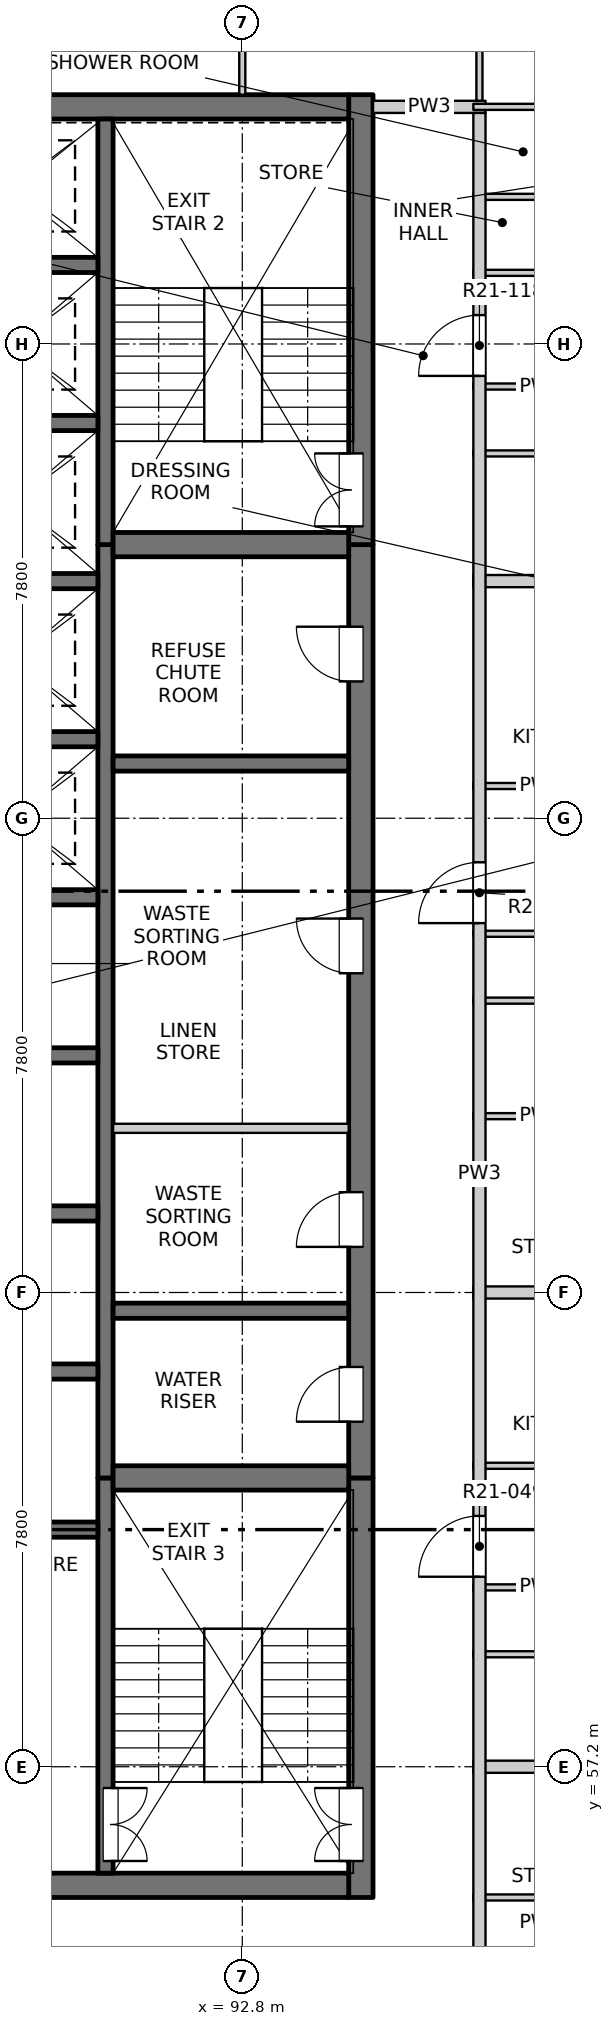
"""IFC4 building model, lengths in metres.
Left out: names, types, materials, properties, quantities, classifications, styles, units other than length and angle.
Written with IfcOpenShell. Run it as: python <this file> out.ifc"""

import sys

from ifc_helpers import new_model, si_unit, direction, frame, frame_2d, origin, place, context, subcontext, project, spatial, rectangle, extrude, element, fill, save


model = new_model("IFC4")
c1 = context("Model", 3, precision=1e-05, world=origin(), true_north=direction((0.0, 1.0)))
c2 = subcontext(c1, "Body", "Model", "MODEL_VIEW")
j1 = project(units=[si_unit("LENGTHUNIT", "METRE"), si_unit("PLANEANGLEUNIT", "RADIAN")], contexts=[c1])
p1 = place(None, origin())
s1 = spatial("IfcSite", under=j1, at=p1, CompositionType="ELEMENT")
p2 = place(p1, origin())
s2 = spatial("IfcBuilding", under=s1, at=p2, CompositionType="ELEMENT")
p3 = place(p2, frame((0.0, 0.0, 214.3)))
s3 = spatial("IfcBuildingStorey", under=s2, at=p3, CompositionType="ELEMENT", Elevation=214.3)
p4 = place(p3, frame((94.75, 55.05, -0.25), z_axis=(0.0, 0.0, 1.0), x_axis=(0.0, 1.0, 0.0)))
e1 = element("IfcWall", 1, at=p4, inside=s3, PredefinedType="SOLIDWALL", context=c2, shape_type="SweptSolid", body=[
    extrude(rectangle(XDim=6.9, YDim=0.4, at=frame_2d((3.45, 0.0))), origin(), (0.0, 0.0, 1.0), 3.4),
])
p5 = place(p4, frame((0.6, 0.0, 0.25)))
e2 = element("IfcOpeningElement", 2, at=p5, cuts=e1, PredefinedType="OPENING", context=c2, shape_type="SweptSolid", body=[
    extrude(rectangle(XDim=1.2, YDim=2.1, at=frame_2d((0.6, 1.05))), frame((0.0, 0.21, 0.0), z_axis=(0.0, -1.0, 0.0), x_axis=(1.0, 0.0, 0.0)), (0.0, 0.0, 1.0), 0.42),
])
p6 = place(p3, frame((94.75, 61.95, -0.25), z_axis=(0.0, 0.0, 1.0), x_axis=(0.0, 1.0, 0.0)))
e3 = element("IfcWall", 3, at=p6, inside=s3, PredefinedType="SOLIDWALL", context=c2, shape_type="SweptSolid", body=[
    extrude(rectangle(XDim=15.35, YDim=0.4, at=frame_2d((7.675, 0.0))), origin(), (0.0, 0.0, 1.0), 3.4),
])
p7 = place(p6, frame((0.925, 0.0, 0.25)))
e4 = element("IfcOpeningElement", 4, at=p7, cuts=e3, PredefinedType="OPENING", context=c2, shape_type="SweptSolid", body=[
    extrude(rectangle(XDim=0.9, YDim=2.1, at=frame_2d((0.45, 1.05))), frame((0.0, 0.21, 0.0), z_axis=(0.0, -1.0, 0.0), x_axis=(1.0, 0.0, 0.0)), (0.0, 0.0, 1.0), 0.42),
])
p8 = place(p6, frame((3.8, 0.0, 0.25)))
e5 = element("IfcOpeningElement", 5, at=p8, cuts=e3, PredefinedType="OPENING", context=c2, shape_type="SweptSolid", body=[
    extrude(rectangle(XDim=0.9, YDim=2.1, at=frame_2d((0.45, 1.05))), frame((0.0, 0.21, 0.0), z_axis=(0.0, -1.0, 0.0), x_axis=(1.0, 0.0, 0.0)), (0.0, 0.0, 1.0), 0.42),
])
p9 = place(p6, frame((8.3, 0.0, 0.25)))
e6 = element("IfcOpeningElement", 6, at=p9, cuts=e3, PredefinedType="OPENING", context=c2, shape_type="SweptSolid", body=[
    extrude(rectangle(XDim=0.9, YDim=2.1, at=frame_2d((0.45, 1.05))), frame((0.0, 0.21, 0.0), z_axis=(0.0, -1.0, 0.0), x_axis=(1.0, 0.0, 0.0)), (0.0, 0.0, 1.0), 0.42),
])
p10 = place(p6, frame((13.1, 0.0, 0.25)))
e7 = element("IfcOpeningElement", 7, at=p10, cuts=e3, PredefinedType="OPENING", context=c2, shape_type="SweptSolid", body=[
    extrude(rectangle(XDim=0.9, YDim=2.1, at=frame_2d((0.45, 1.05))), frame((0.0, 0.21, 0.0), z_axis=(0.0, -1.0, 0.0), x_axis=(1.0, 0.0, 0.0)), (0.0, 0.0, 1.0), 0.42),
])
p11 = place(p3, frame((94.75, 77.3, -0.25), z_axis=(0.0, 0.0, 1.0), x_axis=(0.0, 1.0, 0.0)))
e8 = element("IfcWall", 8, at=p11, inside=s3, PredefinedType="SOLIDWALL", context=c2, shape_type="SweptSolid", body=[
    extrude(rectangle(XDim=7.4, YDim=0.4, at=frame_2d((3.7, 0.0))), origin(), (0.0, 0.0, 1.0), 3.4),
])
p12 = place(p11, frame((0.3, 0.0, 0.25)))
e9 = element("IfcOpeningElement", 9, at=p12, cuts=e8, PredefinedType="OPENING", context=c2, shape_type="SweptSolid", body=[
    extrude(rectangle(XDim=1.2, YDim=2.1, at=frame_2d((0.6, 1.05))), frame((0.0, 0.21, 0.0), z_axis=(0.0, -1.0, 0.0), x_axis=(1.0, 0.0, 0.0)), (0.0, 0.0, 1.0), 0.42),
])
p13 = place(p3, frame((75.45, 55.25, -0.25), z_axis=(0.0, 0.0, 1.0), x_axis=(1.0, 0.0, 0.0)))
e10 = element("IfcWall", 10, at=p13, inside=s3, PredefinedType="SOLIDWALL", context=c2, shape_type="SweptSolid", body=[
    extrude(rectangle(XDim=19.1, YDim=0.4, at=frame_2d((9.55, 0.0))), origin(), (0.0, 0.0, 1.0), 3.4),
])
p14 = place(p13, frame((8.8, 0.0, 0.25)))
e11 = element("IfcOpeningElement", 11, at=p14, cuts=e10, PredefinedType="OPENING", context=c2, shape_type="SweptSolid", body=[
    extrude(rectangle(XDim=1.5, YDim=2.1, at=frame_2d((0.75, 1.05))), frame((0.0, 0.21, 0.0), z_axis=(0.0, -1.0, 0.0), x_axis=(1.0, 0.0, 0.0)), (0.0, 0.0, 1.0), 0.42),
])
p15 = place(p3, frame((75.45, 84.5, -0.25), z_axis=(0.0, 0.0, 1.0), x_axis=(1.0, 0.0, 0.0)))
e12 = element("IfcWall", 12, at=p15, inside=s3, PredefinedType="SOLIDWALL", context=c2, shape_type="SweptSolid", body=[
    extrude(rectangle(XDim=19.1, YDim=0.4, at=frame_2d((9.55, 0.0))), origin(), (0.0, 0.0, 1.0), 3.4),
])
p16 = place(p3, frame((90.55, 55.45, -0.25), z_axis=(0.0, 0.0, 1.0), x_axis=(0.0, 1.0, 0.0)))
e13 = element("IfcWall", 13, at=p16, inside=s3, PredefinedType="SOLIDWALL", context=c2, shape_type="SweptSolid", body=[
    extrude(rectangle(XDim=6.5, YDim=0.25, at=frame_2d((3.25, 0.0))), origin(), (0.0, 0.0, 1.0), 3.4),
])
p17 = place(p16, frame((0.2, 0.0, 0.25)))
e14 = element("IfcOpeningElement", 14, at=p17, cuts=e13, PredefinedType="OPENING", context=c2, shape_type="SweptSolid", body=[
    extrude(rectangle(XDim=1.2, YDim=2.1, at=frame_2d((0.6, 1.05))), frame((0.0, 0.135, 0.0), z_axis=(0.0, -1.0, 0.0), x_axis=(1.0, 0.0, 0.0)), (0.0, 0.0, 1.0), 0.27),
])
p18 = place(p3, frame((90.55, 61.95, -0.25), z_axis=(0.0, 0.0, 1.0), x_axis=(0.0, 1.0, 0.0)))
e15 = element("IfcWall", 15, at=p18, inside=s3, PredefinedType="SOLIDWALL", context=c2, shape_type="SweptSolid", body=[
    extrude(rectangle(XDim=15.35, YDim=0.25, at=frame_2d((7.675, 0.0))), origin(), (0.0, 0.0, 1.0), 3.4),
])
p19 = place(p3, frame((90.55, 77.3, -0.25), z_axis=(0.0, 0.0, 1.0), x_axis=(0.0, 1.0, 0.0)))
e16 = element("IfcWall", 16, at=p19, inside=s3, PredefinedType="SOLIDWALL", context=c2, shape_type="SweptSolid", body=[
    extrude(rectangle(XDim=7.0, YDim=0.25, at=frame_2d((3.5, 0.0))), origin(), (0.0, 0.0, 1.0), 3.4),
])
for number, where, z_axis, x_axis in (
    (17, (87.425, 61.1, -0.25), (0.0, 0.0, 1.0), (1.0, 0.0, 0.0)),
    (18, (87.425, 63.7, -0.25), (0.0, 0.0, 1.0), (1.0, 0.0, 0.0)),
    (19, (87.425, 66.3, -0.25), (0.0, 0.0, 1.0), (1.0, 0.0, 0.0)),
    (20, (87.425, 68.9, -0.25), (0.0, 0.0, 1.0), (1.0, 0.0, 0.0)),
    (21, (87.425, 71.5, -0.25), (0.0, 0.0, 1.0), (1.0, 0.0, 0.0)),
    (22, (87.425, 74.1, -0.25), (0.0, 0.0, 1.0), (1.0, 0.0, 0.0)),
    (23, (87.425, 76.7, -0.25), (0.0, 0.0, 1.0), (1.0, 0.0, 0.0)),
    (24, (87.425, 79.3, -0.25), (0.0, 0.0, 1.0), (1.0, 0.0, 0.0)),
    (25, (87.425, 81.9, -0.25), (0.0, 0.0, 1.0), (1.0, 0.0, 0.0)),
):
    element("IfcWall", number, at=place(p3, frame(where, z_axis=z_axis, x_axis=x_axis)), inside=s3, PredefinedType="SOLIDWALL", context=c2, shape_type="SweptSolid", body=[
        extrude(rectangle(XDim=3.0, YDim=0.25, at=frame_2d((1.5, 0.0))), origin(), (0.0, 0.0, 1.0), 3.4),
    ])
p20 = place(p3, frame((90.675, 61.95, -0.25), z_axis=(0.0, 0.0, 1.0), x_axis=(1.0, 0.0, 0.0)))
e26 = element("IfcWall", 26, at=p20, inside=s3, PredefinedType="SOLIDWALL", context=c2, shape_type="SweptSolid", body=[
    extrude(rectangle(XDim=3.875, YDim=0.4, at=frame_2d((1.938, 0.0))), origin(), (0.0, 0.0, 1.0), 3.4),
])
for number, where, z_axis, x_axis in (
    (27, (90.675, 64.7, -0.25), (0.0, 0.0, 1.0), (1.0, 0.0, 0.0)),
    (28, (90.675, 73.7, -0.25), (0.0, 0.0, 1.0), (1.0, 0.0, 0.0)),
):
    element("IfcWall", number, at=place(p3, frame(where, z_axis=z_axis, x_axis=x_axis)), inside=s3, PredefinedType="SOLIDWALL", context=c2, shape_type="SweptSolid", body=[
        extrude(rectangle(XDim=3.875, YDim=0.25, at=frame_2d((1.938, 0.0))), origin(), (0.0, 0.0, 1.0), 3.4),
    ])
p21 = place(p3, frame((90.675, 77.3, -0.25), z_axis=(0.0, 0.0, 1.0), x_axis=(1.0, 0.0, 0.0)))
e29 = element("IfcWall", 29, at=p21, inside=s3, PredefinedType="SOLIDWALL", context=c2, shape_type="SweptSolid", body=[
    extrude(rectangle(XDim=3.875, YDim=0.4, at=frame_2d((1.938, 0.0))), origin(), (0.0, 0.0, 1.0), 3.4),
])
p22 = place(p3, frame((96.6, 55.05, 0.0), z_axis=(0.0, 0.0, 1.0), x_axis=(1.0, 0.0, 0.0)))
e30 = element("IfcWall", 30, at=p22, inside=s3, PredefinedType="PARTITIONING", context=c2, shape_type="SweptSolid", body=[
    extrude(rectangle(XDim=2.22, YDim=0.1, at=frame_2d((1.11, 0.0))), origin(), (0.0, 0.0, 1.0), 3.15),
])
p23 = place(p3, frame((96.6, 57.2, 0.0), z_axis=(0.0, 0.0, 1.0), x_axis=(1.0, 0.0, 0.0)))
e31 = element("IfcWall", 31, at=p23, inside=s3, PredefinedType="PARTITIONING", context=c2, shape_type="SweptSolid", body=[
    extrude(rectangle(XDim=11.5, YDim=0.2, at=frame_2d((5.75, 0.0))), origin(), (0.0, 0.0, 1.0), 3.15),
])
for number, where, z_axis, x_axis in (
    (32, (96.6, 59.05, 0.0), (0.0, 0.0, 1.0), (1.0, 0.0, 0.0)),
    (33, (96.6, 60.15, 0.0), (0.0, 0.0, 1.0), (1.0, 0.0, 0.0)),
    (34, (96.6, 62.15, 0.0), (0.0, 0.0, 1.0), (1.0, 0.0, 0.0)),
):
    element("IfcWall", number, at=place(p3, frame(where, z_axis=z_axis, x_axis=x_axis)), inside=s3, PredefinedType="PARTITIONING", context=c2, shape_type="SweptSolid", body=[
        extrude(rectangle(XDim=2.22, YDim=0.1, at=frame_2d((1.11, 0.0))), origin(), (0.0, 0.0, 1.0), 3.15),
    ])
p24 = place(p3, frame((96.6, 65.0, 0.0), z_axis=(0.0, 0.0, 1.0), x_axis=(1.0, 0.0, 0.0)))
e35 = element("IfcWall", 35, at=p24, inside=s3, PredefinedType="PARTITIONING", context=c2, shape_type="SweptSolid", body=[
    extrude(rectangle(XDim=11.5, YDim=0.2, at=frame_2d((5.75, 0.0))), origin(), (0.0, 0.0, 1.0), 3.15),
])
p25 = place(p3, frame((90.675, 67.7, 0.0), z_axis=(0.0, 0.0, 1.0), x_axis=(1.0, 0.0, 0.0)))
e36 = element("IfcWall", 36, at=p25, inside=s3, PredefinedType="PARTITIONING", context=c2, shape_type="SweptSolid", body=[
    extrude(rectangle(XDim=3.875, YDim=0.15, at=frame_2d((1.938, 0.0))), origin(), (0.0, 0.0, 1.0), 3.15),
])
for number, where, z_axis, x_axis in (
    (37, (96.6, 67.9, 0.0), (0.0, 0.0, 1.0), (1.0, 0.0, 0.0)),
    (38, (96.6, 69.8, 0.0), (0.0, 0.0, 1.0), (1.0, 0.0, 0.0)),
    (39, (96.6, 70.9, 0.0), (0.0, 0.0, 1.0), (1.0, 0.0, 0.0)),
    (40, (96.6, 73.33, 0.0), (0.0, 0.0, 1.0), (1.0, 0.0, 0.0)),
):
    element("IfcWall", number, at=place(p3, frame(where, z_axis=z_axis, x_axis=x_axis)), inside=s3, PredefinedType="PARTITIONING", context=c2, shape_type="SweptSolid", body=[
        extrude(rectangle(XDim=2.22, YDim=0.1, at=frame_2d((1.11, 0.0))), origin(), (0.0, 0.0, 1.0), 3.15),
    ])
p26 = place(p3, frame((96.6, 76.7, 0.0), z_axis=(0.0, 0.0, 1.0), x_axis=(1.0, 0.0, 0.0)))
e41 = element("IfcWall", 41, at=p26, inside=s3, PredefinedType="PARTITIONING", context=c2, shape_type="SweptSolid", body=[
    extrude(rectangle(XDim=11.5, YDim=0.2, at=frame_2d((5.75, 0.0))), origin(), (0.0, 0.0, 1.0), 2.55),
])
for number, where, z_axis, x_axis in (
    (42, (96.6, 78.8, 0.0), (0.0, 0.0, 1.0), (1.0, 0.0, 0.0)),
    (43, (96.6, 79.9, 0.0), (0.0, 0.0, 1.0), (1.0, 0.0, 0.0)),
    (44, (96.6, 81.77, 0.0), (0.0, 0.0, 1.0), (1.0, 0.0, 0.0)),
    (45, (96.6, 83.02, 0.0), (0.0, 0.0, 1.0), (1.0, 0.0, 0.0)),
):
    element("IfcWall", number, at=place(p3, frame(where, z_axis=z_axis, x_axis=x_axis)), inside=s3, PredefinedType="PARTITIONING", context=c2, shape_type="SweptSolid", body=[
        extrude(rectangle(XDim=2.22, YDim=0.1, at=frame_2d((1.11, 0.0))), origin(), (0.0, 0.0, 1.0), 3.15),
    ])
p27 = place(p3, frame((94.95, 84.5, 0.0), z_axis=(0.0, 0.0, 1.0), x_axis=(1.0, 0.0, 0.0)))
e46 = element("IfcWall", 46, at=p27, inside=s3, PredefinedType="PARTITIONING", context=c2, shape_type="SweptSolid", body=[
    extrude(rectangle(XDim=1.85, YDim=0.2, at=frame_2d((0.925, 0.0))), origin(), (0.0, 0.0, 1.0), 3.15),
])
p28 = place(p3, frame((96.6, 84.5, 0.0), z_axis=(0.0, 0.0, 1.0), x_axis=(1.0, 0.0, 0.0)))
e47 = element("IfcWall", 47, at=p28, inside=s3, PredefinedType="PARTITIONING", context=c2, shape_type="SweptSolid", body=[
    extrude(rectangle(XDim=11.5, YDim=0.1, at=frame_2d((5.75, 0.0))), origin(), (0.0, 0.0, 1.0), 3.15),
])
p29 = place(p28, frame((2.635, 0.0, 0.0)))
e48 = element("IfcOpeningElement", 48, at=p29, cuts=e47, PredefinedType="OPENING", context=c2, shape_type="SweptSolid", body=[
    extrude(rectangle(XDim=0.9, YDim=2.1, at=frame_2d((0.45, 1.05))), frame((0.0, 0.06, 0.0), z_axis=(0.0, -1.0, 0.0), x_axis=(1.0, 0.0, 0.0)), (0.0, 0.0, 1.0), 0.12),
])
p30 = place(p3, frame((92.8, 84.7, 0.0), z_axis=(0.0, 0.0, 1.0), x_axis=(0.0, 1.0, 0.0)))
e49 = element("IfcWall", 49, at=p30, inside=s3, PredefinedType="PARTITIONING", context=c2, shape_type="SweptSolid", body=[
    extrude(rectangle(XDim=3.4, YDim=0.1, at=frame_2d((1.7, 0.0))), origin(), (0.0, 0.0, 1.0), 3.15),
])
p31 = place(p30, frame((1.3, 0.0, 0.0)))
e50 = element("IfcOpeningElement", 50, at=p31, cuts=e49, PredefinedType="OPENING", context=c2, shape_type="SweptSolid", body=[
    extrude(rectangle(XDim=0.9, YDim=2.1, at=frame_2d((0.45, 1.05))), frame((0.0, 0.06, 0.0), z_axis=(0.0, -1.0, 0.0), x_axis=(1.0, 0.0, 0.0)), (0.0, 0.0, 1.0), 0.12),
])
p32 = place(p3, frame((96.7, 49.5, 0.0), z_axis=(0.0, 0.0, 1.0), x_axis=(0.0, 1.0, 0.0)))
e51 = element("IfcWall", 51, at=p32, inside=s3, PredefinedType="PARTITIONING", context=c2, shape_type="SweptSolid", body=[
    extrude(rectangle(XDim=34.9, YDim=0.2, at=frame_2d((17.45, 0.0))), origin(), (0.0, 0.0, 1.0), 3.15),
])
p33 = place(p32, frame((3.275, 0.0, 0.0)))
e52 = element("IfcOpeningElement", 52, at=p33, cuts=e51, PredefinedType="OPENING", context=c2, shape_type="SweptSolid", body=[
    extrude(rectangle(XDim=1.0, YDim=2.1, at=frame_2d((0.5, 1.05))), frame((0.0, 0.11, 0.0), z_axis=(0.0, -1.0, 0.0), x_axis=(1.0, 0.0, 0.0)), (0.0, 0.0, 1.0), 0.22),
])
p34 = place(p32, frame((10.825, 0.0, 0.0)))
e53 = element("IfcOpeningElement", 53, at=p34, cuts=e51, PredefinedType="OPENING", context=c2, shape_type="SweptSolid", body=[
    extrude(rectangle(XDim=1.0, YDim=2.1, at=frame_2d((0.5, 1.05))), frame((0.0, 0.11, 0.0), z_axis=(0.0, -1.0, 0.0), x_axis=(1.0, 0.0, 0.0)), (0.0, 0.0, 1.0), 0.22),
])
p35 = place(p32, frame((21.575, 0.0, 0.0)))
e54 = element("IfcOpeningElement", 54, at=p35, cuts=e51, PredefinedType="OPENING", context=c2, shape_type="SweptSolid", body=[
    extrude(rectangle(XDim=1.0, YDim=2.1, at=frame_2d((0.5, 1.05))), frame((0.0, 0.11, 0.0), z_axis=(0.0, -1.0, 0.0), x_axis=(1.0, 0.0, 0.0)), (0.0, 0.0, 1.0), 0.22),
])
p36 = place(p32, frame((30.575, 0.0, 0.0)))
e55 = element("IfcOpeningElement", 55, at=p36, cuts=e51, PredefinedType="OPENING", context=c2, shape_type="SweptSolid", body=[
    extrude(rectangle(XDim=1.0, YDim=2.1, at=frame_2d((0.5, 1.05))), frame((0.0, 0.11, 0.0), z_axis=(0.0, -1.0, 0.0), x_axis=(1.0, 0.0, 0.0)), (0.0, 0.0, 1.0), 0.22),
])
p37 = place(p3, frame((96.7, 84.6, 0.0), z_axis=(0.0, 0.0, 1.0), x_axis=(0.0, 1.0, 0.0)))
e56 = element("IfcWall", 56, at=p37, inside=s3, PredefinedType="PARTITIONING", context=c2, shape_type="SweptSolid", body=[
    extrude(rectangle(XDim=3.5, YDim=0.1, at=frame_2d((1.75, 0.0))), origin(), (0.0, 0.0, 1.0), 3.15),
])
p38 = place(p37, frame((1.4, 0.0, 0.0)))
e57 = element("IfcOpeningElement", 57, at=p38, cuts=e56, PredefinedType="OPENING", context=c2, shape_type="SweptSolid", body=[
    extrude(rectangle(XDim=0.9, YDim=2.1, at=frame_2d((0.45, 1.05))), frame((0.0, 0.06, 0.0), z_axis=(0.0, -1.0, 0.0), x_axis=(1.0, 0.0, 0.0)), (0.0, 0.0, 1.0), 0.12),
])
p39 = place(p17, origin())
e58 = element("IfcDoor", 58, at=p39, inside=s3, OperationType="DOUBLE_DOOR_SINGLE_SWING", PredefinedType="DOOR", context=c2, shape_type="SweptSolid", body=[
    extrude(rectangle(XDim=1.2, YDim=2.1, at=frame_2d((0.6, 1.05))), frame((0.0, -0.06, 0.0), z_axis=(0.0, -1.0, 0.0), x_axis=(1.0, 0.0, 0.0)), (0.0, 0.0, 1.0), 0.05),
])
fill(e14, e58)
p40 = place(p5, origin())
e59 = element("IfcDoor", 59, at=p40, inside=s3, OperationType="DOUBLE_DOOR_SINGLE_SWING", PredefinedType="DOOR", context=c2, shape_type="SweptSolid", body=[
    extrude(rectangle(XDim=1.2, YDim=2.1, at=frame_2d((0.6, 1.05))), frame((0.0, 0.185, 0.0), z_axis=(0.0, -1.0, 0.0), x_axis=(1.0, 0.0, 0.0)), (0.0, 0.0, 1.0), 0.05),
])
fill(e2, e59)
p41 = place(p34, origin())
e60 = element("IfcDoor", 60, at=p41, inside=s3, OperationType="SINGLE_SWING_LEFT", PredefinedType="DOOR", context=c2, shape_type="SweptSolid", body=[
    extrude(rectangle(XDim=1.0, YDim=2.1, at=frame_2d((0.5, 1.05))), frame((0.0, 0.025, 0.0), z_axis=(0.0, -1.0, 0.0), x_axis=(1.0, 0.0, 0.0)), (0.0, 0.0, 1.0), 0.05),
])
fill(e53, e60)
p42 = place(p7, origin())
e61 = element("IfcDoor", 61, at=p42, inside=s3, OperationType="SINGLE_SWING_LEFT", PredefinedType="DOOR", context=c2, shape_type="SweptSolid", body=[
    extrude(rectangle(XDim=0.9, YDim=2.1, at=frame_2d((0.45, 1.05))), frame((0.0, 0.185, 0.0), z_axis=(0.0, -1.0, 0.0), x_axis=(1.0, 0.0, 0.0)), (0.0, 0.0, 1.0), 0.05),
])
fill(e4, e61)
p43 = place(p8, origin())
e62 = element("IfcDoor", 62, at=p43, inside=s3, OperationType="SINGLE_SWING_LEFT", PredefinedType="DOOR", context=c2, shape_type="SweptSolid", body=[
    extrude(rectangle(XDim=0.9, YDim=2.1, at=frame_2d((0.45, 1.05))), frame((0.0, 0.185, 0.0), z_axis=(0.0, -1.0, 0.0), x_axis=(1.0, 0.0, 0.0)), (0.0, 0.0, 1.0), 0.05),
])
fill(e5, e62)
p44 = place(p9, origin())
e63 = element("IfcDoor", 63, at=p44, inside=s3, OperationType="SINGLE_SWING_RIGHT", PredefinedType="DOOR", context=c2, shape_type="SweptSolid", body=[
    extrude(rectangle(XDim=0.9, YDim=2.1, at=frame_2d((0.45, 1.05))), frame((0.0, 0.185, 0.0), z_axis=(0.0, -1.0, 0.0), x_axis=(1.0, 0.0, 0.0)), (0.0, 0.0, 1.0), 0.05),
])
fill(e6, e63)
p45 = place(p35, origin())
e64 = element("IfcDoor", 64, at=p45, inside=s3, OperationType="SINGLE_SWING_LEFT", PredefinedType="DOOR", context=c2, shape_type="SweptSolid", body=[
    extrude(rectangle(XDim=1.0, YDim=2.1, at=frame_2d((0.5, 1.05))), frame((0.0, 0.025, 0.0), z_axis=(0.0, -1.0, 0.0), x_axis=(1.0, 0.0, 0.0)), (0.0, 0.0, 1.0), 0.05),
])
fill(e54, e64)
p46 = place(p10, origin())
e65 = element("IfcDoor", 65, at=p46, inside=s3, OperationType="SINGLE_SWING_RIGHT", PredefinedType="DOOR", context=c2, shape_type="SweptSolid", body=[
    extrude(rectangle(XDim=0.9, YDim=2.1, at=frame_2d((0.45, 1.05))), frame((0.0, 0.185, 0.0), z_axis=(0.0, -1.0, 0.0), x_axis=(1.0, 0.0, 0.0)), (0.0, 0.0, 1.0), 0.05),
])
fill(e7, e65)
p47 = place(p12, origin())
e66 = element("IfcDoor", 66, at=p47, inside=s3, OperationType="DOUBLE_DOOR_SINGLE_SWING", PredefinedType="DOOR", context=c2, shape_type="SweptSolid", body=[
    extrude(rectangle(XDim=1.2, YDim=2.1, at=frame_2d((0.6, 1.05))), frame((0.0, 0.185, 0.0), z_axis=(0.0, -1.0, 0.0), x_axis=(1.0, 0.0, 0.0)), (0.0, 0.0, 1.0), 0.05),
])
fill(e9, e66)
p48 = place(p36, origin())
e67 = element("IfcDoor", 67, at=p48, inside=s3, OperationType="SINGLE_SWING_LEFT", PredefinedType="DOOR", context=c2, shape_type="SweptSolid", body=[
    extrude(rectangle(XDim=1.0, YDim=2.1, at=frame_2d((0.5, 1.05))), frame((0.0, 0.025, 0.0), z_axis=(0.0, -1.0, 0.0), x_axis=(1.0, 0.0, 0.0)), (0.0, 0.0, 1.0), 0.05),
])
fill(e55, e67)
save(model, sys.argv[1])
